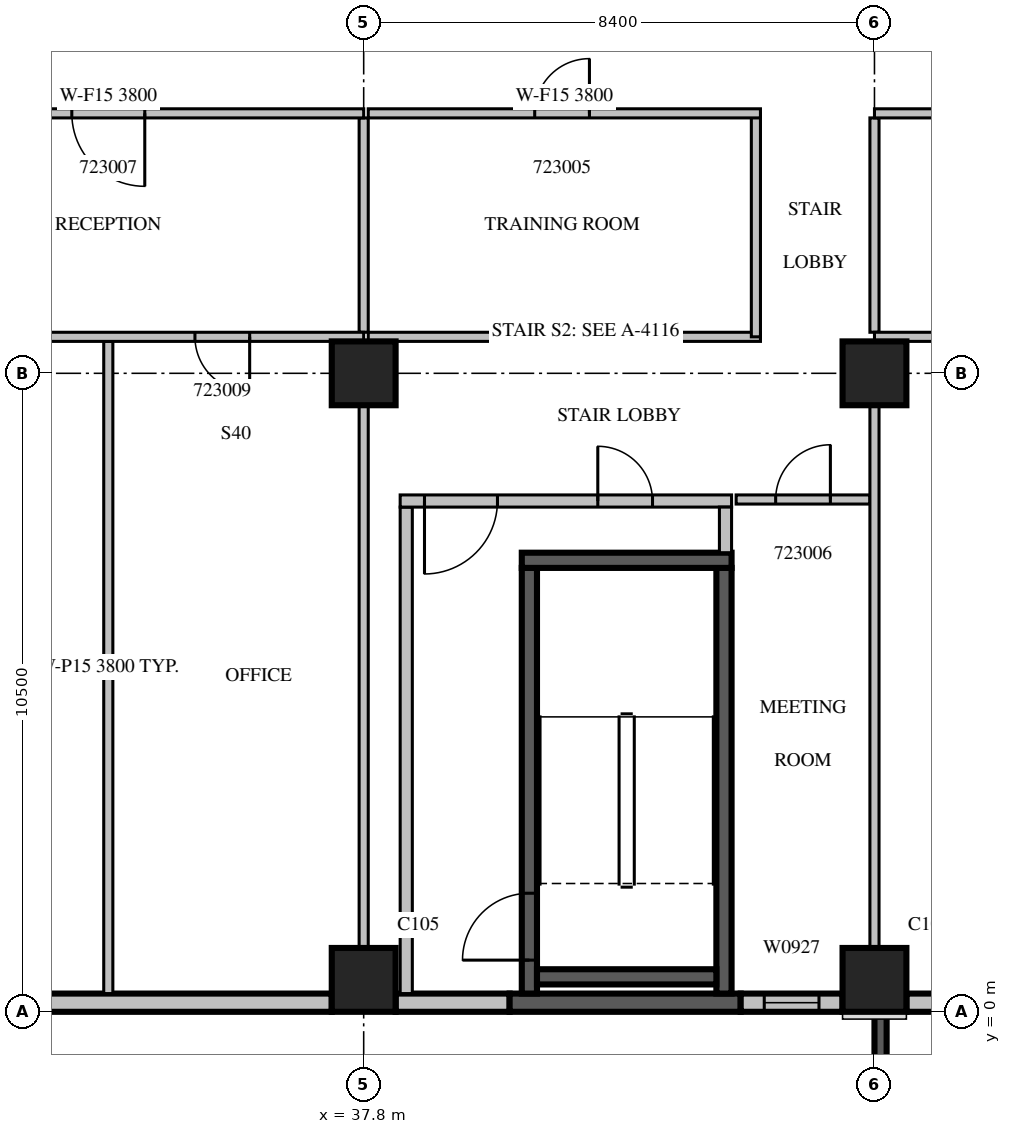
"""IFC4 building model, lengths in metres.
Left out: names, types, materials, properties, quantities, classifications, styles, units other than length and angle.
Written with IfcOpenShell. Run it as: python <this file> out.ifc"""

import sys

from ifc_helpers import new_model, si_unit, direction, frame, frame_2d, origin, origin_2d, place, context, subcontext, project, spatial, rectangle, extrude, source, transform, mapped, element, fill, save


model = new_model("IFC4")
c1 = context("Model", 3, precision=1e-05, world=origin(), true_north=direction((0.0, 1.0)))
c2 = subcontext(c1, "Body", "Model", "MODEL_VIEW")
j1 = project(units=[si_unit("LENGTHUNIT", "METRE"), si_unit("PLANEANGLEUNIT", "RADIAN")], contexts=[c1])
p1 = place(None, origin())
s1 = spatial("IfcSite", under=j1, at=p1, CompositionType="ELEMENT")
p2 = place(p1, origin())
s2 = spatial("IfcBuilding", under=s1, at=p2, CompositionType="ELEMENT")
p3 = place(p2, frame((0.0, 0.0, 107.7)))
s3 = spatial("IfcBuildingStorey", under=s2, at=p3, CompositionType="ELEMENT", Elevation=107.7)
m1 = source(origin(), c2, "Body", "SweptSolid", [
    extrude(rectangle(XDim=1.05, YDim=1.05, at=origin_2d()), origin(), (0.0, 0.0, 1.0), 4.2),
])
for number, where, z_axis, x_axis in (
    (1, (37.8, 0.525, 0.0), (0.0, 0.0, 1.0), (1.0, 0.0, 0.0)),
    (2, (46.2, 0.525, 0.0), (0.0, 0.0, 1.0), (1.0, 0.0, 0.0)),
    (3, (37.8, 10.5, 0.0), (0.0, 0.0, 1.0), (1.0, 0.0, 0.0)),
    (4, (46.2, 10.5, 0.0), (0.0, 0.0, 1.0), (1.0, 0.0, 0.0)),
):
    element("IfcColumn", number, at=place(p3, frame(where, z_axis=z_axis, x_axis=x_axis)), inside=s3, PredefinedType="COLUMN", context=c2, shape_type="MappedRepresentation", body=[
        mapped(m1, transform((0.0, 0.0, 0.0), scale=1.0)),
    ])
m2 = source(origin(), c2, "Body", "SweptSolid", [
    extrude(rectangle(XDim=7.35, YDim=0.3, at=frame_2d((3.675, 0.0))), origin(), (0.0, 0.0, 1.0), 3.8),
])
p4 = place(p3, frame((29.925, 0.15, 0.0), z_axis=(0.0, 0.0, 1.0), x_axis=(1.0, 0.0, 0.0)))
e5 = element("IfcWall", 5, at=p4, inside=s3, PredefinedType="STANDARD", context=c2, shape_type="MappedRepresentation", body=[
    mapped(m2, transform((0.0, 0.0, 0.0), scale=1.0)),
])
p5 = place(p3, frame((38.325, 0.15, 0.0), z_axis=(0.0, 0.0, 1.0), x_axis=(1.0, 0.0, 0.0)))
e6 = element("IfcWall", 6, at=p5, inside=s3, PredefinedType="STANDARD", context=c2, shape_type="SweptSolid", body=[
    extrude(rectangle(XDim=1.875, YDim=0.3, at=frame_2d((0.938, 0.0))), origin(), (0.0, 0.0, 1.0), 3.8),
])
m3 = source(origin(), c2, "Body", "SweptSolid", [
    extrude(rectangle(XDim=3.8, YDim=0.3, at=frame_2d((1.9, 0.0))), origin(), (0.0, 0.0, 1.0), 3.8),
])
p6 = place(p3, frame((40.2, 0.15, 0.0), z_axis=(0.0, 0.0, 1.0), x_axis=(1.0, 0.0, 0.0)))
e7 = element("IfcWall", 7, at=p6, inside=s3, PredefinedType="SOLIDWALL", context=c2, shape_type="MappedRepresentation", body=[
    mapped(m3, transform((0.0, 0.0, 0.0), scale=1.0)),
])
m4 = source(origin(), c2, "Body", "SweptSolid", [
    extrude(rectangle(XDim=1.675, YDim=0.3, at=frame_2d((0.838, 0.0))), origin(), (0.0, 0.0, 1.0), 3.8),
])
p7 = place(p3, frame((44.0, 0.15, 0.0), z_axis=(0.0, 0.0, 1.0), x_axis=(1.0, 0.0, 0.0)))
e8 = element("IfcWall", 8, at=p7, inside=s3, PredefinedType="STANDARD", context=c2, shape_type="MappedRepresentation", body=[
    mapped(m4, transform((0.0, 0.0, 0.0), scale=1.0)),
])
m5 = source(origin(), c2, "Body", "SweptSolid", [
    extrude(rectangle(XDim=0.9, YDim=2.7, at=frame_2d((0.45, 1.35))), frame((0.0, 0.16, 0.0), z_axis=(0.0, -1.0, 0.0), x_axis=(1.0, 0.0, 0.0)), (0.0, 0.0, 1.0), 0.32),
])
p8 = place(p7, frame((0.388, 0.0, 0.6)))
e9 = element("IfcOpeningElement", 9, at=p8, cuts=e8, PredefinedType="OPENING", context=c2, shape_type="MappedRepresentation", body=[
    mapped(m5, transform((0.0, 0.0, 0.0), scale=1.0)),
])
m6 = source(origin(), c2, "Body", "SweptSolid", [
    extrude(rectangle(XDim=4.83, YDim=0.3, at=frame_2d((2.415, 0.0))), origin(), (0.0, 0.0, 1.0), 3.8),
])
p9 = place(p3, frame((46.725, 0.15, 0.0), z_axis=(0.0, 0.0, 1.0), x_axis=(1.0, 0.0, 0.0)))
e10 = element("IfcWall", 10, at=p9, inside=s3, PredefinedType="STANDARD", context=c2, shape_type="MappedRepresentation", body=[
    mapped(m6, transform((0.0, 0.0, 0.0), scale=1.0)),
])
m7 = source(origin(), c2, "Body", "SweptSolid", [
    extrude(rectangle(XDim=1.0, YDim=2.1, at=frame_2d((0.5, 1.05))), frame((0.0, 0.16, 0.0), z_axis=(0.0, -1.0, 0.0), x_axis=(1.0, 0.0, 0.0)), (0.0, 0.0, 1.0), 0.32),
])
p10 = place(p9, frame((1.915, 0.0, 0.0)))
e11 = element("IfcOpeningElement", 11, at=p10, cuts=e10, PredefinedType="OPENING", context=c2, shape_type="MappedRepresentation", body=[
    mapped(m7, transform((0.0, 0.0, 0.0), scale=1.0)),
])
m8 = source(origin(), c2, "Body", "SweptSolid", [
    extrude(rectangle(XDim=3.9, YDim=0.2, at=frame_2d((1.95, 0.0))), origin(), (0.0, 0.0, 1.0), 3.79),
])
p11 = place(p3, frame((46.3, 0.0, 0.0), z_axis=(0.0, 0.0, 1.0), x_axis=(0.0, -1.0, 0.0)))
e12 = element("IfcWall", 12, at=p11, inside=s3, PredefinedType="SOLIDWALL", context=c2, shape_type="MappedRepresentation", body=[
    mapped(m8, transform((0.0, 0.0, 0.0), scale=1.0)),
])
m9 = source(origin(), c2, "Body", "SweptSolid", [
    extrude(rectangle(XDim=2.4, YDim=2.7, at=frame_2d((1.2, 1.35))), frame((0.0, 0.11, 0.0), z_axis=(0.0, -1.0, 0.0), x_axis=(1.0, 0.0, 0.0)), (0.0, 0.0, 1.0), 0.22),
])
p12 = place(p11, frame((0.75, 0.0, 0.6)))
e13 = element("IfcOpeningElement", 13, at=p12, cuts=e12, PredefinedType="OPENING", context=c2, shape_type="MappedRepresentation", body=[
    mapped(m9, transform((0.0, 0.0, 0.0), scale=1.0)),
])
m10 = source(origin(), c2, "Body", "SweptSolid", [
    extrude(rectangle(XDim=7.0, YDim=0.25, at=frame_2d((3.5, 0.0))), origin(), (0.0, 0.0, 1.0), 3.8),
])
p13 = place(p3, frame((40.525, 0.3, 0.0), z_axis=(0.0, 0.0, 1.0), x_axis=(0.0, 1.0, 0.0)))
e14 = element("IfcWall", 14, at=p13, inside=s3, PredefinedType="SOLIDWALL", context=c2, shape_type="MappedRepresentation", body=[
    mapped(m10, transform((0.0, 0.0, 0.0), scale=1.0)),
])
m11 = source(origin(), c2, "Body", "SweptSolid", [
    extrude(rectangle(XDim=1.1, YDim=2.1, at=frame_2d((0.55, 1.05))), frame((0.0, 0.135, 0.0), z_axis=(0.0, -1.0, 0.0), x_axis=(1.0, 0.0, 0.0)), (0.0, 0.0, 1.0), 0.27),
])
p14 = place(p13, frame((0.55, 0.0, 0.0)))
e15 = element("IfcOpeningElement", 15, at=p14, cuts=e14, PredefinedType="OPENING", context=c2, shape_type="MappedRepresentation", body=[
    mapped(m11, transform((0.0, 0.0, 0.0), scale=1.0)),
])
p15 = place(p3, frame((43.725, 0.3, 0.0), z_axis=(0.0, 0.0, 1.0), x_axis=(0.0, 1.0, 0.0)))
e16 = element("IfcWall", 16, at=p15, inside=s3, PredefinedType="SOLIDWALL", context=c2, shape_type="MappedRepresentation", body=[
    mapped(m10, transform((0.0, 0.0, 0.0), scale=1.0)),
])
m12 = source(origin(), c2, "Body", "SweptSolid", [
    extrude(rectangle(XDim=3.45, YDim=0.25, at=frame_2d((1.725, 0.0))), origin(), (0.0, 0.0, 1.0), 3.8),
])
p16 = place(p3, frame((40.4, 7.425, 0.0), z_axis=(0.0, 0.0, 1.0), x_axis=(1.0, 0.0, 0.0)))
e17 = element("IfcWall", 17, at=p16, inside=s3, PredefinedType="SOLIDWALL", context=c2, shape_type="MappedRepresentation", body=[
    mapped(m12, transform((0.0, 0.0, 0.0), scale=1.0)),
])
m13 = source(origin(), c2, "Body", "SweptSolid", [
    extrude(rectangle(XDim=2.95, YDim=0.25, at=frame_2d((1.475, 0.0))), origin(), (0.0, 0.0, 1.0), 3.8),
])
p17 = place(p3, frame((40.65, 0.575, 0.0), z_axis=(0.0, 0.0, 1.0), x_axis=(1.0, 0.0, 0.0)))
e18 = element("IfcWall", 18, at=p17, inside=s3, PredefinedType="SOLIDWALL", context=c2, shape_type="MappedRepresentation", body=[
    mapped(m13, transform((0.0, 0.0, 0.0), scale=1.0)),
])
m14 = source(origin(), c2, "Body", "SweptSolid", [
    extrude(rectangle(XDim=8.0, YDim=0.2, at=frame_2d((4.0, 0.0))), origin(), (0.0, 0.0, 1.0), 3.8),
])
p18 = place(p3, frame((38.5, 0.3, 0.0), z_axis=(0.0, 0.0, 1.0), x_axis=(0.0, 1.0, 0.0)))
e19 = element("IfcWall", 19, at=p18, inside=s3, PredefinedType="PARTITIONING", context=c2, shape_type="MappedRepresentation", body=[
    mapped(m14, transform((0.0, 0.0, 0.0), scale=1.0)),
])
m15 = source(origin(), c2, "Body", "SweptSolid", [
    extrude(rectangle(XDim=5.45, YDim=0.2, at=frame_2d((2.725, 0.0))), origin(), (0.0, 0.0, 1.0), 3.8),
])
p19 = place(p3, frame((38.4, 8.4, 0.0), z_axis=(0.0, 0.0, 1.0), x_axis=(1.0, 0.0, 0.0)))
e20 = element("IfcWall", 20, at=p19, inside=s3, PredefinedType="PARTITIONING", context=c2, shape_type="MappedRepresentation", body=[
    mapped(m15, transform((0.0, 0.0, 0.0), scale=1.0)),
])
m16 = source(origin(), c2, "Body", "SweptSolid", [
    extrude(rectangle(XDim=1.2, YDim=2.1, at=frame_2d((0.6, 1.05))), frame((0.0, 0.11, 0.0), z_axis=(0.0, -1.0, 0.0), x_axis=(1.0, 0.0, 0.0)), (0.0, 0.0, 1.0), 0.22),
])
p20 = place(p19, frame((0.4, 0.0, 0.0)))
e21 = element("IfcOpeningElement", 21, at=p20, cuts=e20, PredefinedType="OPENING", context=c2, shape_type="MappedRepresentation", body=[
    mapped(m16, transform((0.0, 0.0, 0.0), scale=1.0)),
])
m17 = source(origin(), c2, "Body", "SweptSolid", [
    extrude(rectangle(XDim=0.9, YDim=2.1, at=frame_2d((0.45, 1.05))), frame((0.0, 0.11, 0.0), z_axis=(0.0, -1.0, 0.0), x_axis=(1.0, 0.0, 0.0)), (0.0, 0.0, 1.0), 0.22),
])
p21 = place(p19, frame((3.25, 0.0, 0.0)))
e22 = element("IfcOpeningElement", 22, at=p21, cuts=e20, PredefinedType="OPENING", context=c2, shape_type="MappedRepresentation", body=[
    mapped(m17, transform((0.0, 0.0, 0.0), scale=1.0)),
])
m18 = source(origin(), c2, "Body", "SweptSolid", [
    extrude(rectangle(XDim=0.75, YDim=0.2, at=frame_2d((0.375, 0.0))), origin(), (0.0, 0.0, 1.0), 3.8),
])
p22 = place(p3, frame((43.75, 7.55, 0.0), z_axis=(0.0, 0.0, 1.0), x_axis=(0.0, 1.0, 0.0)))
e23 = element("IfcWall", 23, at=p22, inside=s3, PredefinedType="PARTITIONING", context=c2, shape_type="MappedRepresentation", body=[
    mapped(m18, transform((0.0, 0.0, 0.0), scale=1.0)),
])
m19 = source(origin(), c2, "Body", "SweptSolid", [
    extrude(rectangle(XDim=6.45, YDim=0.15, at=frame_2d((3.225, 0.0))), origin(), (0.0, 0.0, 1.0), 3.8),
])
p23 = place(p3, frame((37.875, 11.1, 0.0), z_axis=(0.0, 0.0, 1.0), x_axis=(1.0, 0.0, 0.0)))
e24 = element("IfcWall", 24, at=p23, inside=s3, PredefinedType="PARTITIONING", context=c2, shape_type="MappedRepresentation", body=[
    mapped(m19, transform((0.0, 0.0, 0.0), scale=1.0)),
])
p24 = place(p3, frame((44.25, 11.1, 0.0), z_axis=(0.0, 0.0, 1.0), x_axis=(0.0, 1.0, 0.0)))
e25 = element("IfcWall", 25, at=p24, inside=s3, PredefinedType="PARTITIONING", context=c2, shape_type="SweptSolid", body=[
    extrude(rectangle(XDim=3.675, YDim=0.15, at=frame_2d((1.837, 0.0))), origin(), (0.0, 0.0, 1.0), 3.8),
])
p25 = place(p3, frame((44.325, 14.775, 0.0), z_axis=(0.0, 0.0, 1.0), x_axis=(-1.0, 0.0, 0.0)))
e26 = element("IfcWall", 26, at=p25, inside=s3, PredefinedType="PARTITIONING", context=c2, shape_type="MappedRepresentation", body=[
    mapped(m19, transform((0.0, 0.0, 0.0), scale=1.0)),
])
m20 = source(origin(), c2, "Body", "SweptSolid", [
    extrude(rectangle(XDim=0.9, YDim=2.1, at=frame_2d((0.45, 1.05))), frame((0.0, 0.085, 0.0), z_axis=(0.0, -1.0, 0.0), x_axis=(1.0, 0.0, 0.0)), (0.0, 0.0, 1.0), 0.17),
])
p26 = place(p25, frame((2.812, 0.0, 0.0)))
e27 = element("IfcOpeningElement", 27, at=p26, cuts=e26, PredefinedType="OPENING", context=c2, shape_type="MappedRepresentation", body=[
    mapped(m20, transform((0.0, 0.0, 0.0), scale=1.0)),
])
m21 = source(origin(), c2, "Body", "SweptSolid", [
    extrude(rectangle(XDim=2.2, YDim=0.15, at=frame_2d((1.1, 0.0))), origin(), (0.0, 0.0, 1.0), 3.8),
])
p27 = place(p3, frame((46.125, 8.425, 0.0), z_axis=(0.0, 0.0, 1.0), x_axis=(-1.0, 0.0, 0.0)))
e28 = element("IfcWall", 28, at=p27, inside=s3, PredefinedType="PARTITIONING", context=c2, shape_type="MappedRepresentation", body=[
    mapped(m21, transform((0.0, 0.0, 0.0), scale=1.0)),
])
p28 = place(p27, frame((0.65, 0.0, 0.0)))
e29 = element("IfcOpeningElement", 29, at=p28, cuts=e28, PredefinedType="OPENING", context=c2, shape_type="MappedRepresentation", body=[
    mapped(m20, transform((0.0, 0.0, 0.0), scale=1.0)),
])
p29 = place(p3, frame((33.6, 0.3, 0.0), z_axis=(0.0, 0.0, 1.0), x_axis=(0.0, 1.0, 0.0)))
e30 = element("IfcWall", 30, at=p29, inside=s3, PredefinedType="PARTITIONING", context=c2, shape_type="SweptSolid", body=[
    extrude(rectangle(XDim=10.725, YDim=0.15, at=frame_2d((5.362, 0.0))), origin(), (0.0, 0.0, 1.0), 3.8),
])
m22 = source(origin(), c2, "Body", "SweptSolid", [
    extrude(rectangle(XDim=8.927, YDim=0.15, at=frame_2d((4.463, 0.0))), origin(), (0.0, 0.0, 1.0), 3.8),
])
p30 = place(p3, frame((37.8, 1.049, 0.0), z_axis=(0.0, 0.0, 1.0), x_axis=(0.0, 1.0, 0.0)))
e31 = element("IfcWall", 31, at=p30, inside=s3, PredefinedType="PARTITIONING", context=c2, shape_type="MappedRepresentation", body=[
    mapped(m22, transform((0.0, 0.0, 0.0), scale=1.0)),
])
p31 = place(p3, frame((37.8, 11.175, 0.0), z_axis=(0.0, 0.0, 1.0), x_axis=(0.0, 1.0, 0.0)))
e32 = element("IfcWall", 32, at=p31, inside=s3, PredefinedType="PARTITIONING", context=c2, shape_type="SweptSolid", body=[
    extrude(rectangle(XDim=3.525, YDim=0.15, at=frame_2d((1.762, 0.0))), origin(), (0.0, 0.0, 1.0), 3.8),
])
m23 = source(origin(), c2, "Body", "SweptSolid", [
    extrude(rectangle(XDim=8.4, YDim=0.15, at=frame_2d((4.2, 0.0))), origin(), (0.0, 0.0, 1.0), 3.8),
])
p32 = place(p3, frame((37.8, 11.1, 0.0), z_axis=(0.0, 0.0, 1.0), x_axis=(-1.0, 0.0, 0.0)))
e33 = element("IfcWall", 33, at=p32, inside=s3, PredefinedType="PARTITIONING", context=c2, shape_type="MappedRepresentation", body=[
    mapped(m23, transform((0.0, 0.0, 0.0), scale=1.0)),
])
p33 = place(p32, frame((5.575, 0.0, 0.0)))
e34 = element("IfcOpeningElement", 34, at=p33, cuts=e33, PredefinedType="OPENING", context=c2, shape_type="MappedRepresentation", body=[
    mapped(m20, transform((0.0, 0.0, 0.0), scale=1.0)),
])
p34 = place(p32, frame((1.875, 0.0, 0.0)))
e35 = element("IfcOpeningElement", 35, at=p34, cuts=e33, PredefinedType="OPENING", context=c2, shape_type="MappedRepresentation", body=[
    mapped(m20, transform((0.0, 0.0, 0.0), scale=1.0)),
])
p35 = place(p3, frame((46.2, 1.049, 0.0), z_axis=(0.0, 0.0, 1.0), x_axis=(0.0, 1.0, 0.0)))
e36 = element("IfcWall", 36, at=p35, inside=s3, PredefinedType="PARTITIONING", context=c2, shape_type="MappedRepresentation", body=[
    mapped(m22, transform((0.0, 0.0, 0.0), scale=1.0)),
])
m24 = source(origin(), c2, "Body", "SweptSolid", [
    extrude(rectangle(XDim=3.525, YDim=0.15, at=frame_2d((1.762, 0.0))), origin(), (0.0, 0.0, 1.0), 3.8),
])
p36 = place(p3, frame((46.2, 11.175, 0.0), z_axis=(0.0, 0.0, 1.0), x_axis=(0.0, 1.0, 0.0)))
e37 = element("IfcWall", 37, at=p36, inside=s3, PredefinedType="PARTITIONING", context=c2, shape_type="MappedRepresentation", body=[
    mapped(m24, transform((0.0, 0.0, 0.0), scale=1.0)),
])
m25 = source(origin(), c2, "Body", "SweptSolid", [
    extrude(rectangle(XDim=24.9, YDim=0.15, at=frame_2d((12.45, 0.0))), origin(), (0.0, 0.0, 1.0), 3.3),
])
p37 = place(p3, frame((71.1, 11.1, 0.0), z_axis=(0.0, 0.0, 1.0), x_axis=(-1.0, 0.0, 0.0)))
e38 = element("IfcWall", 38, at=p37, inside=s3, PredefinedType="PARTITIONING", context=c2, shape_type="MappedRepresentation", body=[
    mapped(m25, transform((0.0, 0.0, 0.0), scale=1.0)),
])
m26 = source(origin(), c2, "Body", "SweptSolid", [
    extrude(rectangle(XDim=1.1, YDim=2.1, at=frame_2d((0.55, 1.05))), frame((0.0, 0.085, 0.0), z_axis=(0.0, -1.0, 0.0), x_axis=(1.0, 0.0, 0.0)), (0.0, 0.0, 1.0), 0.17),
])
p38 = place(p37, frame((21.41, 0.0, 0.0)))
e39 = element("IfcOpeningElement", 39, at=p38, cuts=e38, PredefinedType="OPENING", context=c2, shape_type="MappedRepresentation", body=[
    mapped(m26, transform((0.0, 0.0, 0.0), scale=1.0)),
])
p39 = place(p37, frame((2.205, 0.0, 0.0)))
e40 = element("IfcOpeningElement", 40, at=p39, cuts=e38, PredefinedType="OPENING", context=c2, shape_type="MappedRepresentation", body=[
    mapped(m20, transform((0.0, 0.0, 0.0), scale=1.0)),
])
p40 = place(p3, frame((37.8, 14.775, 0.0), z_axis=(0.0, 0.0, 1.0), x_axis=(-1.0, 0.0, 0.0)))
e41 = element("IfcWall", 41, at=p40, inside=s3, PredefinedType="PARTITIONING", context=c2, shape_type="MappedRepresentation", body=[
    mapped(m23, transform((0.0, 0.0, 0.0), scale=1.0)),
])
m27 = source(origin(), c2, "Body", "SweptSolid", [
    extrude(rectangle(XDim=1.2, YDim=2.1, at=frame_2d((0.6, 1.05))), frame((0.0, 0.085, 0.0), z_axis=(0.0, -1.0, 0.0), x_axis=(1.0, 0.0, 0.0)), (0.0, 0.0, 1.0), 0.17),
])
p41 = place(p40, frame((3.6, 0.0, 0.0)))
e42 = element("IfcOpeningElement", 42, at=p41, cuts=e41, PredefinedType="OPENING", context=c2, shape_type="MappedRepresentation", body=[
    mapped(m27, transform((0.0, 0.0, 0.0), scale=1.0)),
])
p42 = place(p3, frame((71.1, 14.775, 0.0), z_axis=(0.0, 0.0, 1.0), x_axis=(-1.0, 0.0, 0.0)))
e43 = element("IfcWall", 43, at=p42, inside=s3, PredefinedType="PARTITIONING", context=c2, shape_type="MappedRepresentation", body=[
    mapped(m25, transform((0.0, 0.0, 0.0), scale=1.0)),
])
p43 = place(p42, frame((21.41, 0.0, 0.0)))
e44 = element("IfcOpeningElement", 44, at=p43, cuts=e43, PredefinedType="OPENING", context=c2, shape_type="MappedRepresentation", body=[
    mapped(m26, transform((0.0, 0.0, 0.0), scale=1.0)),
])
p44 = place(p42, frame((15.63, 0.0, 0.0)))
e45 = element("IfcOpeningElement", 45, at=p44, cuts=e43, PredefinedType="OPENING", context=c2, shape_type="MappedRepresentation", body=[
    mapped(m20, transform((0.0, 0.0, 0.0), scale=1.0)),
])
p45 = place(p42, frame((11.278, 0.0, 0.0)))
e46 = element("IfcOpeningElement", 46, at=p45, cuts=e43, PredefinedType="OPENING", context=c2, shape_type="MappedRepresentation", body=[
    mapped(m20, transform((0.0, 0.0, 0.0), scale=1.0)),
])
p46 = place(p42, frame((8.338, 0.0, 0.0)))
e47 = element("IfcOpeningElement", 47, at=p46, cuts=e43, PredefinedType="OPENING", context=c2, shape_type="MappedRepresentation", body=[
    mapped(m20, transform((0.0, 0.0, 0.0), scale=1.0)),
])
p47 = place(p42, frame((4.92, 0.0, 0.0)))
e48 = element("IfcOpeningElement", 48, at=p47, cuts=e43, PredefinedType="OPENING", context=c2, shape_type="MappedRepresentation", body=[
    mapped(m20, transform((0.0, 0.0, 0.0), scale=1.0)),
])
p48 = place(p42, frame((1.103, 0.0, 0.0)))
e49 = element("IfcOpeningElement", 49, at=p48, cuts=e43, PredefinedType="OPENING", context=c2, shape_type="MappedRepresentation", body=[
    mapped(m27, transform((0.0, 0.0, 0.0), scale=1.0)),
])
m28 = source(origin(), c2, "Body", "SweptSolid", [
    extrude(rectangle(XDim=0.9, YDim=2.7, at=frame_2d((0.45, 1.35))), frame((0.0, 0.03, 0.0), z_axis=(0.0, -1.0, 0.0), x_axis=(1.0, 0.0, 0.0)), (0.0, 0.0, 1.0), 0.06),
])
p49 = place(p8, origin())
e50 = element("IfcWindow", 50, at=p49, inside=s3, PartitioningType="SINGLE_PANEL", PredefinedType="WINDOW", context=c2, shape_type="MappedRepresentation", body=[
    mapped(m28, transform((0.0, 0.0, 0.0), scale=1.0)),
])
fill(e9, e50)
m29 = source(origin(), c2, "Body", "SweptSolid", [
    extrude(rectangle(XDim=1.1, YDim=2.1, at=frame_2d((0.55, 1.05))), frame((0.0, 0.025, 0.0), z_axis=(0.0, -1.0, 0.0), x_axis=(1.0, 0.0, 0.0)), (0.0, 0.0, 1.0), 0.05),
])
p50 = place(p14, origin())
e51 = element("IfcDoor", 51, at=p50, inside=s3, OperationType="SINGLE_SWING_LEFT", PredefinedType="DOOR", context=c2, shape_type="MappedRepresentation", body=[
    mapped(m29, transform((0.0, 0.0, 0.0), scale=1.0)),
])
fill(e15, e51)
m30 = source(origin(), c2, "Body", "SweptSolid", [
    extrude(rectangle(XDim=1.2, YDim=2.1, at=frame_2d((0.6, 1.05))), frame((0.0, 0.025, 0.0), z_axis=(0.0, -1.0, 0.0), x_axis=(1.0, 0.0, 0.0)), (0.0, 0.0, 1.0), 0.05),
])
p51 = place(p20, origin())
e52 = element("IfcDoor", 52, at=p51, inside=s3, OperationType="SINGLE_SWING_RIGHT", PredefinedType="DOOR", context=c2, shape_type="MappedRepresentation", body=[
    mapped(m30, transform((0.0, 0.0, 0.0), scale=1.0)),
])
fill(e21, e52)
m31 = source(origin(), c2, "Body", "SweptSolid", [
    extrude(rectangle(XDim=0.9, YDim=2.1, at=frame_2d((0.45, 1.05))), frame((0.0, 0.025, 0.0), z_axis=(0.0, -1.0, 0.0), x_axis=(1.0, 0.0, 0.0)), (0.0, 0.0, 1.0), 0.05),
])
p52 = place(p21, origin())
e53 = element("IfcDoor", 53, at=p52, inside=s3, OperationType="SINGLE_SWING_LEFT", PredefinedType="DOOR", context=c2, shape_type="MappedRepresentation", body=[
    mapped(m31, transform((0.0, 0.0, 0.0), scale=1.0)),
])
fill(e22, e53)
p53 = place(p26, origin())
e54 = element("IfcDoor", 54, at=p53, inside=s3, OperationType="SINGLE_SWING_RIGHT", PredefinedType="DOOR", context=c2, shape_type="MappedRepresentation", body=[
    mapped(m31, transform((0.0, 0.0, 0.0), scale=1.0)),
])
fill(e27, e54)
p54 = place(p28, origin())
e55 = element("IfcDoor", 55, at=p54, inside=s3, OperationType="SINGLE_SWING_RIGHT", PredefinedType="DOOR", context=c2, shape_type="MappedRepresentation", body=[
    mapped(m31, transform((0.0, 0.0, 0.0), scale=1.0)),
])
fill(e29, e55)
p55 = place(p41, origin())
e56 = element("IfcDoor", 56, at=p55, inside=s3, OperationType="SINGLE_SWING_LEFT", PredefinedType="DOOR", context=c2, shape_type="MappedRepresentation", body=[
    mapped(m30, transform((0.0, 0.0, 0.0), scale=1.0)),
])
fill(e42, e56)
p56 = place(p34, origin())
e57 = element("IfcDoor", 57, at=p56, inside=s3, OperationType="SINGLE_SWING_LEFT", PredefinedType="DOOR", context=c2, shape_type="MappedRepresentation", body=[
    mapped(m31, transform((0.0, 0.0, 0.0), scale=1.0)),
])
fill(e35, e57)
save(model, sys.argv[1])
